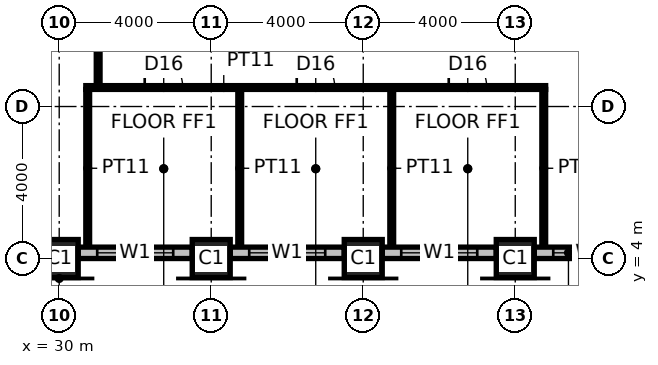
"""IFC4 building model, lengths in metres.
Left out: names, types, materials, properties, quantities, classifications, styles, units other than length and angle.
Written with IfcOpenShell. Run it as: python <this file> out.ifc"""

import sys

from ifc_helpers import new_model, si_unit, direction, frame, frame_2d, origin, origin_2d, place, context, subcontext, project, spatial, rectangle, hollow_rectangle, extrude, element, fill, save


model = new_model("IFC4")
c1 = context("Model", 3, precision=1e-05, world=origin(), true_north=direction((0.0, 1.0)))
c2 = subcontext(c1, "Body", "Model", "MODEL_VIEW")
j1 = project(units=[si_unit("LENGTHUNIT", "METRE"), si_unit("PLANEANGLEUNIT", "RADIAN")], contexts=[c1])
p1 = place(None, origin())
s1 = spatial("IfcSite", under=j1, at=p1, CompositionType="ELEMENT")
p2 = place(p1, origin())
s2 = spatial("IfcBuilding", under=s1, at=p2, CompositionType="ELEMENT")
p3 = place(p2, frame((0.0, 0.0, 242.2)))
s3 = spatial("IfcBuildingStorey", under=s2, at=p3, CompositionType="ELEMENT", Elevation=242.2)
for number, where, z_axis, x_axis in (
    (1, (30.0, 4.0, 0.0), (0.0, 0.0, 1.0), (1.0, 0.0, 0.0)),
    (2, (34.0, 4.0, 0.0), (0.0, 0.0, 1.0), (1.0, 0.0, 0.0)),
    (3, (38.0, 4.0, 0.0), (0.0, 0.0, 1.0), (1.0, 0.0, 0.0)),
    (4, (42.0, 4.0, 0.0), (0.0, 0.0, 1.0), (1.0, 0.0, 0.0)),
):
    element("IfcColumn", number, at=place(p3, frame(where, z_axis=z_axis, x_axis=x_axis)), inside=s3, PredefinedType="COLUMN", context=c2, shape_type="SweptSolid", body=[
        extrude(hollow_rectangle(XDim=1.0, YDim=1.0, WallThickness=0.1, at=origin_2d()), origin(), (0.0, 0.0, 1.0), 4.0),
    ])
p4 = place(p3, frame((30.7, 8.5, 0.0), z_axis=(0.0, 0.0, 1.0), x_axis=(1.0, 0.0, 0.0)))
e5 = element("IfcWall", 5, at=p4, inside=s3, PredefinedType="PARTITIONING", context=c2, shape_type="SweptSolid", body=[
    extrude(rectangle(XDim=12.1, YDim=0.1, at=frame_2d((6.05, 0.0))), origin(), (0.0, 0.0, 1.0), 3.85),
])
p5 = place(p4, frame((1.55, 0.0, 0.0)))
e6 = element("IfcOpeningElement", 6, at=p5, cuts=e5, PredefinedType="OPENING", context=c2, shape_type="SweptSolid", body=[
    extrude(rectangle(XDim=1.0, YDim=2.2, at=frame_2d((0.5, 1.1))), frame((0.0, 0.06, 0.0), z_axis=(0.0, -1.0, 0.0), x_axis=(1.0, 0.0, 0.0)), (0.0, 0.0, 1.0), 0.12),
])
p6 = place(p4, frame((5.55, 0.0, 0.0)))
e7 = element("IfcOpeningElement", 7, at=p6, cuts=e5, PredefinedType="OPENING", context=c2, shape_type="SweptSolid", body=[
    extrude(rectangle(XDim=1.0, YDim=2.2, at=frame_2d((0.5, 1.1))), frame((0.0, 0.06, 0.0), z_axis=(0.0, -1.0, 0.0), x_axis=(1.0, 0.0, 0.0)), (0.0, 0.0, 1.0), 0.12),
])
p7 = place(p4, frame((9.55, 0.0, 0.0)))
e8 = element("IfcOpeningElement", 8, at=p7, cuts=e5, PredefinedType="OPENING", context=c2, shape_type="SweptSolid", body=[
    extrude(rectangle(XDim=1.0, YDim=2.2, at=frame_2d((0.5, 1.1))), frame((0.0, 0.06, 0.0), z_axis=(0.0, -1.0, 0.0), x_axis=(1.0, 0.0, 0.0)), (0.0, 0.0, 1.0), 0.12),
])
for number, where, z_axis, x_axis in (
    (9, (30.75, 4.3, 0.0), (0.0, 0.0, 1.0), (0.0, 1.0, 0.0)),
    (10, (34.75, 4.3, 0.0), (0.0, 0.0, 1.0), (0.0, 1.0, 0.0)),
    (11, (38.75, 4.3, 0.0), (0.0, 0.0, 1.0), (0.0, 1.0, 0.0)),
    (12, (42.75, 4.3, 0.0), (0.0, 0.0, 1.0), (0.0, 1.0, 0.0)),
):
    element("IfcWall", number, at=place(p3, frame(where, z_axis=z_axis, x_axis=x_axis)), inside=s3, PredefinedType="PARTITIONING", context=c2, shape_type="SweptSolid", body=[
        extrude(rectangle(XDim=4.15, YDim=0.1, at=frame_2d((2.075, 0.0))), origin(), (0.0, 0.0, 1.0), 3.85),
    ])
p8 = place(p3, frame((31.025, 15.7, 0.0), z_axis=(0.0, 0.0, 1.0), x_axis=(0.0, -1.0, 0.0)))
e13 = element("IfcWall", 13, at=p8, inside=s3, PredefinedType="PARTITIONING", context=c2, shape_type="SweptSolid", body=[
    extrude(rectangle(XDim=7.15, YDim=0.1, at=frame_2d((3.575, 0.0))), origin(), (0.0, 0.0, 1.0), 3.85),
])
p9 = place(p8, frame((3.075, 0.0, 0.0)))
e14 = element("IfcOpeningElement", 14, at=p9, cuts=e13, PredefinedType="OPENING", context=c2, shape_type="SweptSolid", body=[
    extrude(rectangle(XDim=1.0, YDim=2.2, at=frame_2d((0.5, 1.1))), frame((0.0, 0.06, 0.0), z_axis=(0.0, -1.0, 0.0), x_axis=(1.0, 0.0, 0.0)), (0.0, 0.0, 1.0), 0.12),
])
p10 = place(p3, frame((30.5, 4.15, 0.0), z_axis=(0.0, 0.0, 1.0), x_axis=(1.0, 0.0, 0.0)))
e15 = element("IfcWall", 15, at=p10, inside=s3, PredefinedType="ELEMENTEDWALL", context=c2, shape_type="SweptSolid", body=[
    extrude(rectangle(XDim=3.0, YDim=0.3, at=frame_2d((1.5, 0.0))), origin(), (0.0, 0.0, 1.0), 2.85),
])
p11 = place(p10, frame((0.5, 0.0, 0.8)))
e16 = element("IfcOpeningElement", 16, at=p11, cuts=e15, PredefinedType="OPENING", context=c2, shape_type="SweptSolid", body=[
    extrude(rectangle(XDim=2.0, YDim=2.0, at=frame_2d((1.0, 1.0))), frame((0.0, 0.16, 0.0), z_axis=(0.0, -1.0, 0.0), x_axis=(1.0, 0.0, 0.0)), (0.0, 0.0, 1.0), 0.32),
])
p12 = place(p3, frame((34.5, 4.15, 0.0), z_axis=(0.0, 0.0, 1.0), x_axis=(1.0, 0.0, 0.0)))
e17 = element("IfcWall", 17, at=p12, inside=s3, PredefinedType="ELEMENTEDWALL", context=c2, shape_type="SweptSolid", body=[
    extrude(rectangle(XDim=3.0, YDim=0.3, at=frame_2d((1.5, 0.0))), origin(), (0.0, 0.0, 1.0), 2.85),
])
p13 = place(p12, frame((0.5, 0.0, 0.8)))
e18 = element("IfcOpeningElement", 18, at=p13, cuts=e17, PredefinedType="OPENING", context=c2, shape_type="SweptSolid", body=[
    extrude(rectangle(XDim=2.0, YDim=2.0, at=frame_2d((1.0, 1.0))), frame((0.0, 0.16, 0.0), z_axis=(0.0, -1.0, 0.0), x_axis=(1.0, 0.0, 0.0)), (0.0, 0.0, 1.0), 0.32),
])
p14 = place(p3, frame((38.5, 4.15, 0.0), z_axis=(0.0, 0.0, 1.0), x_axis=(1.0, 0.0, 0.0)))
e19 = element("IfcWall", 19, at=p14, inside=s3, PredefinedType="ELEMENTEDWALL", context=c2, shape_type="SweptSolid", body=[
    extrude(rectangle(XDim=3.0, YDim=0.3, at=frame_2d((1.5, 0.0))), origin(), (0.0, 0.0, 1.0), 2.85),
])
p15 = place(p14, frame((0.5, 0.0, 0.8)))
e20 = element("IfcOpeningElement", 20, at=p15, cuts=e19, PredefinedType="OPENING", context=c2, shape_type="SweptSolid", body=[
    extrude(rectangle(XDim=2.0, YDim=2.0, at=frame_2d((1.0, 1.0))), frame((0.0, 0.16, 0.0), z_axis=(0.0, -1.0, 0.0), x_axis=(1.0, 0.0, 0.0)), (0.0, 0.0, 1.0), 0.32),
])
p16 = place(p3, frame((42.5, 4.15, 0.0), z_axis=(0.0, 0.0, 1.0), x_axis=(1.0, 0.0, 0.0)))
e21 = element("IfcWall", 21, at=p16, inside=s3, PredefinedType="ELEMENTEDWALL", context=c2, shape_type="SweptSolid", body=[
    extrude(rectangle(XDim=3.0, YDim=0.3, at=frame_2d((1.5, 0.0))), origin(), (0.0, 0.0, 1.0), 2.85),
])
p17 = place(p16, frame((0.5, 0.0, 0.8)))
e22 = element("IfcOpeningElement", 22, at=p17, cuts=e21, PredefinedType="OPENING", context=c2, shape_type="SweptSolid", body=[
    extrude(rectangle(XDim=2.0, YDim=2.0, at=frame_2d((1.0, 1.0))), frame((0.0, 0.16, 0.0), z_axis=(0.0, -1.0, 0.0), x_axis=(1.0, 0.0, 0.0)), (0.0, 0.0, 1.0), 0.32),
])
p18 = place(p5, origin())
e23 = element("IfcDoor", 23, at=p18, inside=s3, OperationType="SINGLE_SWING_LEFT", PredefinedType="DOOR", context=c2, shape_type="SweptSolid", body=[
    extrude(rectangle(XDim=1.0, YDim=2.2, at=frame_2d((0.5, 1.1))), frame((0.0, 0.025, 0.0), z_axis=(0.0, -1.0, 0.0), x_axis=(1.0, 0.0, 0.0)), (0.0, 0.0, 1.0), 0.05),
])
fill(e6, e23)
p19 = place(p6, origin())
e24 = element("IfcDoor", 24, at=p19, inside=s3, OperationType="SINGLE_SWING_LEFT", PredefinedType="DOOR", context=c2, shape_type="SweptSolid", body=[
    extrude(rectangle(XDim=1.0, YDim=2.2, at=frame_2d((0.5, 1.1))), frame((0.0, 0.025, 0.0), z_axis=(0.0, -1.0, 0.0), x_axis=(1.0, 0.0, 0.0)), (0.0, 0.0, 1.0), 0.05),
])
fill(e7, e24)
p20 = place(p7, origin())
e25 = element("IfcDoor", 25, at=p20, inside=s3, OperationType="SINGLE_SWING_LEFT", PredefinedType="DOOR", context=c2, shape_type="SweptSolid", body=[
    extrude(rectangle(XDim=1.0, YDim=2.2, at=frame_2d((0.5, 1.1))), frame((0.0, 0.025, 0.0), z_axis=(0.0, -1.0, 0.0), x_axis=(1.0, 0.0, 0.0)), (0.0, 0.0, 1.0), 0.05),
])
fill(e8, e25)
p21 = place(p11, origin())
e26 = element("IfcWindow", 26, at=p21, inside=s3, PartitioningType="SINGLE_PANEL", PredefinedType="WINDOW", context=c2, shape_type="SweptSolid", body=[
    extrude(rectangle(XDim=2.0, YDim=2.0, at=frame_2d((1.0, 1.0))), frame((0.0, 0.03, 0.0), z_axis=(0.0, -1.0, 0.0), x_axis=(1.0, 0.0, 0.0)), (0.0, 0.0, 1.0), 0.06),
])
fill(e16, e26)
p22 = place(p13, origin())
e27 = element("IfcWindow", 27, at=p22, inside=s3, PartitioningType="SINGLE_PANEL", PredefinedType="WINDOW", context=c2, shape_type="SweptSolid", body=[
    extrude(rectangle(XDim=2.0, YDim=2.0, at=frame_2d((1.0, 1.0))), frame((0.0, 0.03, 0.0), z_axis=(0.0, -1.0, 0.0), x_axis=(1.0, 0.0, 0.0)), (0.0, 0.0, 1.0), 0.06),
])
fill(e18, e27)
p23 = place(p15, origin())
e28 = element("IfcWindow", 28, at=p23, inside=s3, PartitioningType="SINGLE_PANEL", PredefinedType="WINDOW", context=c2, shape_type="SweptSolid", body=[
    extrude(rectangle(XDim=2.0, YDim=2.0, at=frame_2d((1.0, 1.0))), frame((0.0, 0.03, 0.0), z_axis=(0.0, -1.0, 0.0), x_axis=(1.0, 0.0, 0.0)), (0.0, 0.0, 1.0), 0.06),
])
fill(e20, e28)
p24 = place(p17, origin())
e29 = element("IfcWindow", 29, at=p24, inside=s3, PartitioningType="SINGLE_PANEL", PredefinedType="WINDOW", context=c2, shape_type="SweptSolid", body=[
    extrude(rectangle(XDim=2.0, YDim=2.0, at=frame_2d((1.0, 1.0))), frame((0.0, 0.03, 0.0), z_axis=(0.0, -1.0, 0.0), x_axis=(1.0, 0.0, 0.0)), (0.0, 0.0, 1.0), 0.06),
])
fill(e22, e29)
save(model, sys.argv[1])
